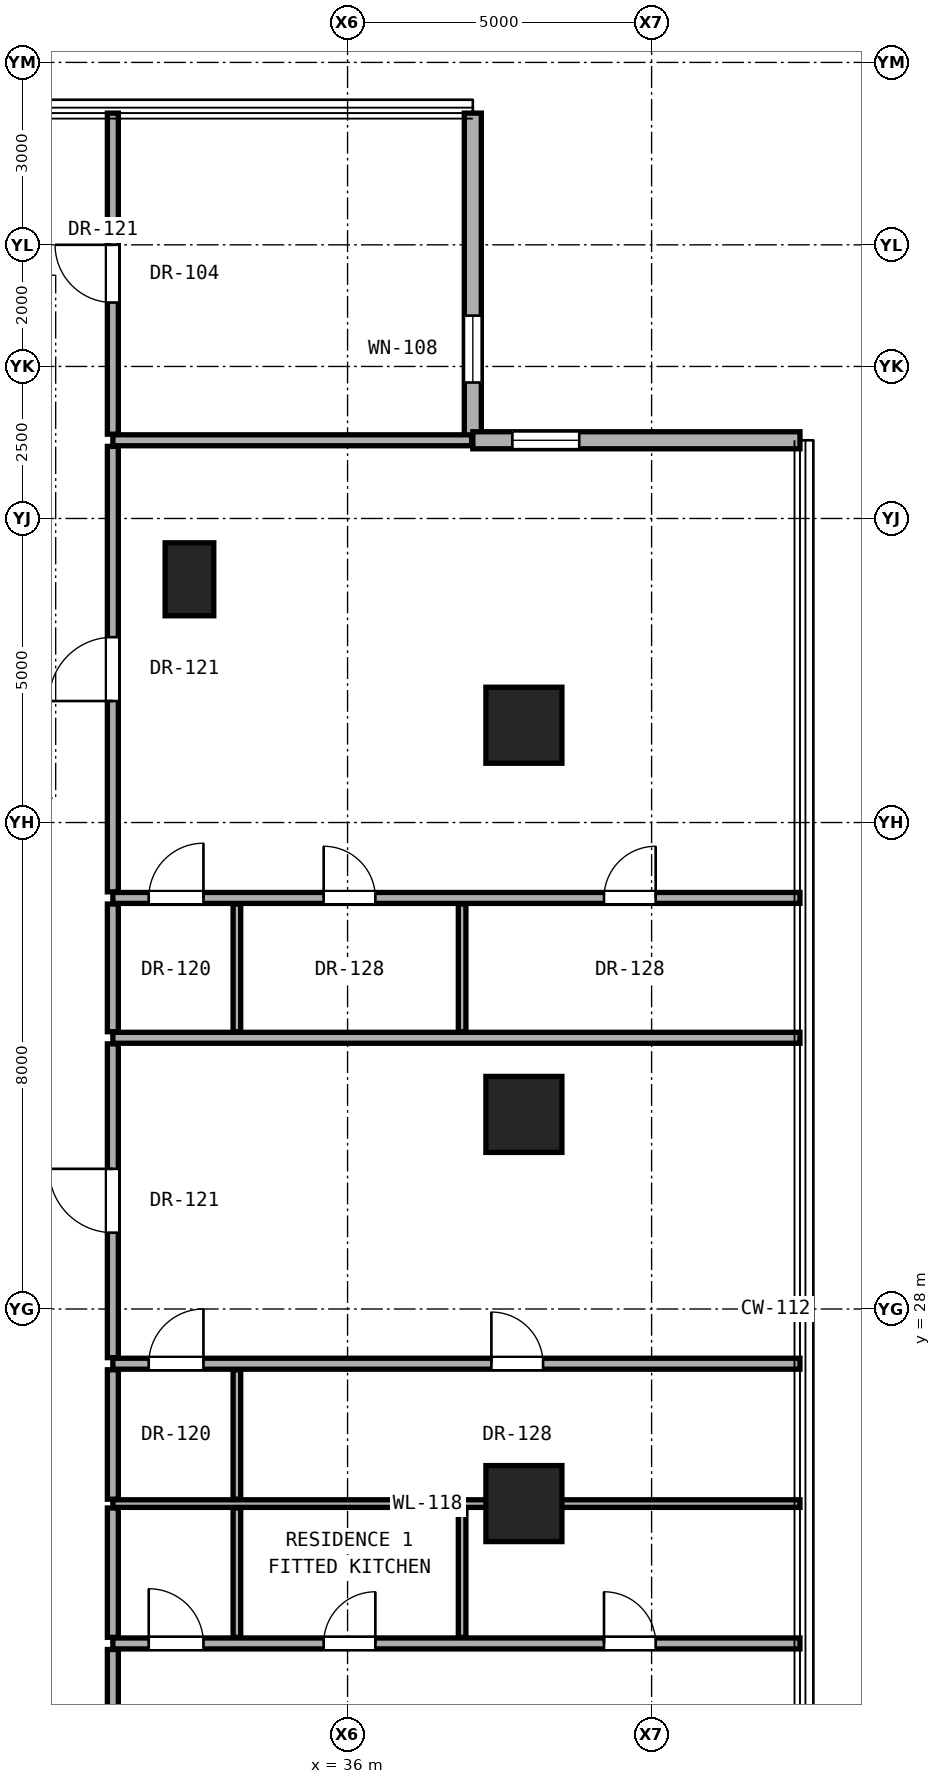
"""IFC4 building model, lengths in metres.
Left out: names, types, materials, properties, quantities, classifications, styles, units other than length and angle.
Written with IfcOpenShell. Run it as: python <this file> out.ifc"""

import sys

from ifc_helpers import new_model, si_unit, direction, frame, frame_2d, origin, origin_2d, place, context, subcontext, project, spatial, rectangle, hollow_rectangle, extrude, element, fill, save


model = new_model("IFC4")
c1 = context("Model", 3, precision=1e-05, world=origin(), true_north=direction((0.0, 1.0)))
c2 = subcontext(c1, "Body", "Model", "MODEL_VIEW")
j1 = project(units=[si_unit("LENGTHUNIT", "METRE"), si_unit("PLANEANGLEUNIT", "RADIAN")], contexts=[c1])
p1 = place(None, origin())
s1 = spatial("IfcSite", under=j1, at=p1, CompositionType="ELEMENT")
p2 = place(p1, origin())
s2 = spatial("IfcBuilding", under=s1, at=p2, CompositionType="ELEMENT")
p3 = place(p2, frame((0.0, 0.0, 45.5)))
s3 = spatial("IfcBuildingStorey", under=s2, at=p3, CompositionType="ELEMENT", Elevation=45.5)
for number, where, z_axis, x_axis in (
    (1, (38.9, 24.8, 0.0), (0.0, 0.0, 1.0), (1.0, 0.0, 0.0)),
    (2, (38.9, 31.2, 0.0), (0.0, 0.0, 1.0), (1.0, 0.0, 0.0)),
    (3, (38.9, 37.6, 0.0), (0.0, 0.0, 1.0), (1.0, 0.0, 0.0)),
):
    element("IfcColumn", number, at=place(p3, frame(where, z_axis=z_axis, x_axis=x_axis)), inside=s3, PredefinedType="COLUMN", context=c2, shape_type="SweptSolid", body=[
        extrude(hollow_rectangle(XDim=1.25, YDim=1.25, WallThickness=0.07, at=origin_2d()), origin(), (0.0, 0.0, 1.0), 3.3),
    ])
p4 = place(p3, frame((33.4, 40.0, 0.0), z_axis=(0.0, 0.0, 1.0), x_axis=(1.0, 0.0, 0.0)))
e4 = element("IfcColumn", 4, at=p4, inside=s3, PredefinedType="PILASTER", context=c2, shape_type="SweptSolid", body=[
    extrude(rectangle(XDim=0.8, YDim=1.2, at=origin_2d()), origin(), (0.0, 0.0, 1.0), 3.3),
])
p5 = place(p3, frame((38.06, 42.286, 0.0), z_axis=(0.0, 0.0, 1.0), x_axis=(0.0, 1.0, 0.0)))
e5 = element("IfcWall", 5, at=p5, inside=s3, PredefinedType="SOLIDWALL", context=c2, shape_type="SweptSolid", body=[
    extrude(rectangle(XDim=5.38, YDim=0.28, at=frame_2d((2.69, 0.0))), origin(), (0.0, 0.0, 1.0), 3.04),
])
p6 = place(p5, frame((0.95, 0.0, 0.85)))
e6 = element("IfcOpeningElement", 6, at=p6, cuts=e5, PredefinedType="OPENING", context=c2, shape_type="SweptSolid", body=[
    extrude(rectangle(XDim=1.1, YDim=2.0, at=frame_2d((0.55, 1.0))), frame((0.0, 0.15, 0.0), z_axis=(0.0, -1.0, 0.0), x_axis=(1.0, 0.0, 0.0)), (0.0, 0.0, 1.0), 0.3),
])
p7 = place(p3, frame((43.44, 42.286, 0.0), z_axis=(0.0, 0.0, 1.0), x_axis=(-1.0, 0.0, 0.0)))
e7 = element("IfcWall", 7, at=p7, inside=s3, PredefinedType="SOLIDWALL", context=c2, shape_type="SweptSolid", body=[
    extrude(rectangle(XDim=5.38, YDim=0.28, at=frame_2d((2.69, 0.0))), origin(), (0.0, 0.0, 1.0), 3.04),
])
p8 = place(p7, frame((3.63, 0.0, 0.85)))
e8 = element("IfcOpeningElement", 8, at=p8, cuts=e7, PredefinedType="OPENING", context=c2, shape_type="SweptSolid", body=[
    extrude(rectangle(XDim=1.1, YDim=2.0, at=frame_2d((0.55, 1.0))), frame((0.0, 0.15, 0.0), z_axis=(0.0, -1.0, 0.0), x_axis=(1.0, 0.0, 0.0)), (0.0, 0.0, 1.0), 0.3),
])
p9 = place(p3, frame((32.14, 22.5, 0.0), z_axis=(0.0, 0.0, 1.0), x_axis=(1.0, 0.0, 0.0)))
e9 = element("IfcWall", 9, at=p9, inside=s3, PredefinedType="PARTITIONING", context=c2, shape_type="SweptSolid", body=[
    extrude(rectangle(XDim=11.3, YDim=0.18, at=frame_2d((5.65, 0.0))), origin(), (0.0, 0.0, 1.0), 2.125),
])
p10 = place(p9, frame((8.077, 0.0, 0.0)))
e10 = element("IfcOpeningElement", 10, at=p10, cuts=e9, PredefinedType="OPENING", context=c2, shape_type="SweptSolid", body=[
    extrude(rectangle(XDim=0.85, YDim=2.01, at=frame_2d((0.425, 1.005))), frame((0.0, 0.1, 0.0), z_axis=(0.0, -1.0, 0.0), x_axis=(1.0, 0.0, 0.0)), (0.0, 0.0, 1.0), 0.2),
])
p11 = place(p9, frame((3.467, 0.0, 0.0)))
e11 = element("IfcOpeningElement", 11, at=p11, cuts=e9, PredefinedType="OPENING", context=c2, shape_type="SweptSolid", body=[
    extrude(rectangle(XDim=0.85, YDim=2.01, at=frame_2d((0.425, 1.005))), frame((0.0, 0.1, 0.0), z_axis=(0.0, -1.0, 0.0), x_axis=(1.0, 0.0, 0.0)), (0.0, 0.0, 1.0), 0.2),
])
p12 = place(p9, frame((0.59, 0.0, 0.0)))
e12 = element("IfcOpeningElement", 12, at=p12, cuts=e9, PredefinedType="OPENING", context=c2, shape_type="SweptSolid", body=[
    extrude(rectangle(XDim=0.9, YDim=2.1, at=frame_2d((0.45, 1.05))), frame((0.0, 0.1, 0.0), z_axis=(0.0, -1.0, 0.0), x_axis=(1.0, 0.0, 0.0)), (0.0, 0.0, 1.0), 0.2),
])
p13 = place(p3, frame((32.14, 24.8, 0.0), z_axis=(0.0, 0.0, 1.0), x_axis=(1.0, 0.0, 0.0)))
e13 = element("IfcWall", 13, at=p13, inside=s3, PredefinedType="PARTITIONING", context=c2, shape_type="SweptSolid", body=[
    extrude(rectangle(XDim=11.3, YDim=0.125, at=frame_2d((5.65, 0.0))), origin(), (0.0, 0.0, 1.0), 2.125),
])
p14 = place(p3, frame((32.14, 27.1, 0.0), z_axis=(0.0, 0.0, 1.0), x_axis=(1.0, 0.0, 0.0)))
e14 = element("IfcWall", 14, at=p14, inside=s3, PredefinedType="PARTITIONING", context=c2, shape_type="SweptSolid", body=[
    extrude(rectangle(XDim=11.3, YDim=0.18, at=frame_2d((5.65, 0.0))), origin(), (0.0, 0.0, 1.0), 2.125),
])
p15 = place(p14, frame((6.225, 0.0, 0.0)))
e15 = element("IfcOpeningElement", 15, at=p15, cuts=e14, PredefinedType="OPENING", context=c2, shape_type="SweptSolid", body=[
    extrude(rectangle(XDim=0.85, YDim=2.01, at=frame_2d((0.425, 1.005))), frame((0.0, 0.1, 0.0), z_axis=(0.0, -1.0, 0.0), x_axis=(1.0, 0.0, 0.0)), (0.0, 0.0, 1.0), 0.2),
])
p16 = place(p14, frame((0.59, 0.0, 0.0)))
e16 = element("IfcOpeningElement", 16, at=p16, cuts=e14, PredefinedType="OPENING", context=c2, shape_type="SweptSolid", body=[
    extrude(rectangle(XDim=0.9, YDim=2.1, at=frame_2d((0.45, 1.05))), frame((0.0, 0.1, 0.0), z_axis=(0.0, -1.0, 0.0), x_axis=(1.0, 0.0, 0.0)), (0.0, 0.0, 1.0), 0.2),
])
p17 = place(p3, frame((32.14, 32.46, 0.0), z_axis=(0.0, 0.0, 1.0), x_axis=(1.0, 0.0, 0.0)))
e17 = element("IfcWall", 17, at=p17, inside=s3, PredefinedType="PARTITIONING", context=c2, shape_type="SweptSolid", body=[
    extrude(rectangle(XDim=11.3, YDim=0.18, at=frame_2d((5.65, 0.0))), origin(), (0.0, 0.0, 1.0), 2.125),
])
p18 = place(p3, frame((32.14, 34.76, 0.0), z_axis=(0.0, 0.0, 1.0), x_axis=(1.0, 0.0, 0.0)))
e18 = element("IfcWall", 18, at=p18, inside=s3, PredefinedType="PARTITIONING", context=c2, shape_type="SweptSolid", body=[
    extrude(rectangle(XDim=11.3, YDim=0.18, at=frame_2d((5.65, 0.0))), origin(), (0.0, 0.0, 1.0), 2.125),
])
p19 = place(p18, frame((8.077, 0.0, 0.0)))
e19 = element("IfcOpeningElement", 19, at=p19, cuts=e18, PredefinedType="OPENING", context=c2, shape_type="SweptSolid", body=[
    extrude(rectangle(XDim=0.85, YDim=2.01, at=frame_2d((0.425, 1.005))), frame((0.0, 0.1, 0.0), z_axis=(0.0, -1.0, 0.0), x_axis=(1.0, 0.0, 0.0)), (0.0, 0.0, 1.0), 0.2),
])
p20 = place(p18, frame((3.467, 0.0, 0.0)))
e20 = element("IfcOpeningElement", 20, at=p20, cuts=e18, PredefinedType="OPENING", context=c2, shape_type="SweptSolid", body=[
    extrude(rectangle(XDim=0.85, YDim=2.01, at=frame_2d((0.425, 1.005))), frame((0.0, 0.1, 0.0), z_axis=(0.0, -1.0, 0.0), x_axis=(1.0, 0.0, 0.0)), (0.0, 0.0, 1.0), 0.2),
])
p21 = place(p18, frame((0.59, 0.0, 0.0)))
e21 = element("IfcOpeningElement", 21, at=p21, cuts=e18, PredefinedType="OPENING", context=c2, shape_type="SweptSolid", body=[
    extrude(rectangle(XDim=0.9, YDim=2.1, at=frame_2d((0.45, 1.05))), frame((0.0, 0.1, 0.0), z_axis=(0.0, -1.0, 0.0), x_axis=(1.0, 0.0, 0.0)), (0.0, 0.0, 1.0), 0.2),
])
p22 = place(p3, frame((32.14, 42.286, 0.0), z_axis=(0.0, 0.0, 1.0), x_axis=(1.0, 0.0, 0.0)))
e22 = element("IfcWall", 22, at=p22, inside=s3, PredefinedType="PARTITIONING", context=c2, shape_type="SweptSolid", body=[
    extrude(rectangle(XDim=5.9, YDim=0.18, at=frame_2d((2.95, 0.0))), origin(), (0.0, 0.0, 1.0), 3.06),
])
p23 = place(p3, frame((32.14, 13.814, 0.0), z_axis=(0.0, 0.0, 1.0), x_axis=(0.0, 1.0, 0.0)))
e23 = element("IfcWall", 23, at=p23, inside=s3, PredefinedType="PARTITIONING", context=c2, shape_type="SweptSolid", body=[
    extrude(rectangle(XDim=8.586, YDim=0.18, at=frame_2d((4.293, 0.0))), origin(), (0.0, 0.0, 1.0), 2.436),
])
p24 = place(p23, frame((3.768, 0.0, 0.0)))
e24 = element("IfcOpeningElement", 24, at=p24, cuts=e23, PredefinedType="OPENING", context=c2, shape_type="SweptSolid", body=[
    extrude(rectangle(XDim=1.05, YDim=2.2, at=frame_2d((0.525, 1.1))), frame((0.0, 0.1, 0.0), z_axis=(0.0, -1.0, 0.0), x_axis=(1.0, 0.0, 0.0)), (0.0, 0.0, 1.0), 0.2),
])
for number, where, z_axis, x_axis in (
    (25, (32.14, 22.6, 0.0), (0.0, 0.0, 1.0), (0.0, 1.0, 0.0)),
    (26, (32.14, 24.873, 0.0), (0.0, 0.0, 1.0), (0.0, 1.0, 0.0)),
):
    element("IfcWall", number, at=place(p3, frame(where, z_axis=z_axis, x_axis=x_axis)), inside=s3, PredefinedType="PARTITIONING", context=c2, shape_type="SweptSolid", body=[
        extrude(rectangle(XDim=2.127, YDim=0.18, at=frame_2d((1.064, 0.0))), origin(), (0.0, 0.0, 1.0), 2.279),
    ])
p25 = place(p3, frame((32.14, 27.2, 0.0), z_axis=(0.0, 0.0, 1.0), x_axis=(0.0, 1.0, 0.0)))
e27 = element("IfcWall", 27, at=p25, inside=s3, PredefinedType="PARTITIONING", context=c2, shape_type="SweptSolid", body=[
    extrude(rectangle(XDim=5.16, YDim=0.18, at=frame_2d((2.58, 0.0))), origin(), (0.0, 0.0, 1.0), 2.279),
])
p26 = place(p25, frame((2.055, 0.0, 0.0)))
e28 = element("IfcOpeningElement", 28, at=p26, cuts=e27, PredefinedType="OPENING", context=c2, shape_type="SweptSolid", body=[
    extrude(rectangle(XDim=1.05, YDim=2.2, at=frame_2d((0.525, 1.1))), frame((0.0, 0.1, 0.0), z_axis=(0.0, -1.0, 0.0), x_axis=(1.0, 0.0, 0.0)), (0.0, 0.0, 1.0), 0.2),
])
p27 = place(p3, frame((32.14, 32.56, 0.0), z_axis=(0.0, 0.0, 1.0), x_axis=(0.0, 1.0, 0.0)))
e29 = element("IfcWall", 29, at=p27, inside=s3, PredefinedType="PARTITIONING", context=c2, shape_type="SweptSolid", body=[
    extrude(rectangle(XDim=2.1, YDim=0.18, at=frame_2d((1.05, 0.0))), origin(), (0.0, 0.0, 1.0), 3.06),
])
p28 = place(p3, frame((32.14, 34.86, 0.0), z_axis=(0.0, 0.0, 1.0), x_axis=(0.0, 1.0, 0.0)))
e30 = element("IfcWall", 30, at=p28, inside=s3, PredefinedType="PARTITIONING", context=c2, shape_type="SweptSolid", body=[
    extrude(rectangle(XDim=7.326, YDim=0.18, at=frame_2d((3.663, 0.0))), origin(), (0.0, 0.0, 1.0), 2.436),
])
p29 = place(p28, frame((3.138, 0.0, 0.0)))
e31 = element("IfcOpeningElement", 31, at=p29, cuts=e30, PredefinedType="OPENING", context=c2, shape_type="SweptSolid", body=[
    extrude(rectangle(XDim=1.05, YDim=2.2, at=frame_2d((0.525, 1.1))), frame((0.0, 0.1, 0.0), z_axis=(0.0, -1.0, 0.0), x_axis=(1.0, 0.0, 0.0)), (0.0, 0.0, 1.0), 0.2),
])
p30 = place(p3, frame((32.14, 42.386, 0.0), z_axis=(0.0, 0.0, 1.0), x_axis=(0.0, 1.0, 0.0)))
e32 = element("IfcWall", 32, at=p30, inside=s3, PredefinedType="PARTITIONING", context=c2, shape_type="SweptSolid", body=[
    extrude(rectangle(XDim=5.28, YDim=0.18, at=frame_2d((2.64, 0.0))), origin(), (0.0, 0.0, 1.0), 3.06),
])
p31 = place(p30, frame((2.165, 0.0, 0.0)))
e33 = element("IfcOpeningElement", 33, at=p31, cuts=e32, PredefinedType="OPENING", context=c2, shape_type="SweptSolid", body=[
    extrude(rectangle(XDim=0.95, YDim=2.15, at=frame_2d((0.475, 1.075))), frame((0.0, 0.1, 0.0), z_axis=(0.0, -1.0, 0.0), x_axis=(1.0, 0.0, 0.0)), (0.0, 0.0, 1.0), 0.2),
])
for number, where, z_axis, x_axis in (
    (34, (34.18, 22.6, 0.0), (0.0, 0.0, 1.0), (0.0, 1.0, 0.0)),
    (35, (34.18, 24.873, 0.0), (0.0, 0.0, 1.0), (0.0, 1.0, 0.0)),
):
    element("IfcWall", number, at=place(p3, frame(where, z_axis=z_axis, x_axis=x_axis)), inside=s3, PredefinedType="PARTITIONING", context=c2, shape_type="SweptSolid", body=[
        extrude(rectangle(XDim=2.127, YDim=0.125, at=frame_2d((1.064, 0.0))), origin(), (0.0, 0.0, 1.0), 2.279),
    ])
p32 = place(p3, frame((34.18, 32.56, 0.0), z_axis=(0.0, 0.0, 1.0), x_axis=(0.0, 1.0, 0.0)))
e36 = element("IfcWall", 36, at=p32, inside=s3, PredefinedType="PARTITIONING", context=c2, shape_type="SweptSolid", body=[
    extrude(rectangle(XDim=2.1, YDim=0.125, at=frame_2d((1.05, 0.0))), origin(), (0.0, 0.0, 1.0), 3.06),
])
p33 = place(p3, frame((37.884, 22.6, 0.0), z_axis=(0.0, 0.0, 1.0), x_axis=(0.0, 1.0, 0.0)))
e37 = element("IfcWall", 37, at=p33, inside=s3, PredefinedType="PARTITIONING", context=c2, shape_type="SweptSolid", body=[
    extrude(rectangle(XDim=2.127, YDim=0.125, at=frame_2d((1.064, 0.0))), origin(), (0.0, 0.0, 1.0), 2.279),
])
p34 = place(p3, frame((37.884, 32.56, 0.0), z_axis=(0.0, 0.0, 1.0), x_axis=(0.0, 1.0, 0.0)))
e38 = element("IfcWall", 38, at=p34, inside=s3, PredefinedType="PARTITIONING", context=c2, shape_type="SweptSolid", body=[
    extrude(rectangle(XDim=2.1, YDim=0.125, at=frame_2d((1.05, 0.0))), origin(), (0.0, 0.0, 1.0), 3.06),
])
p35 = place(p6, origin())
e39 = element("IfcWindow", 39, at=p35, inside=s3, PartitioningType="SINGLE_PANEL", PredefinedType="WINDOW", context=c2, shape_type="SweptSolid", body=[
    extrude(rectangle(XDim=1.1, YDim=2.0, at=frame_2d((0.55, 1.0))), frame((0.0, 0.03, 0.0), z_axis=(0.0, -1.0, 0.0), x_axis=(1.0, 0.0, 0.0)), (0.0, 0.0, 1.0), 0.06),
])
fill(e6, e39)
p36 = place(p8, origin())
e40 = element("IfcWindow", 40, at=p36, inside=s3, PartitioningType="SINGLE_PANEL", PredefinedType="WINDOW", context=c2, shape_type="SweptSolid", body=[
    extrude(rectangle(XDim=1.1, YDim=2.0, at=frame_2d((0.55, 1.0))), frame((0.0, 0.03, 0.0), z_axis=(0.0, -1.0, 0.0), x_axis=(1.0, 0.0, 0.0)), (0.0, 0.0, 1.0), 0.06),
])
fill(e8, e40)
p37 = place(p10, origin())
e41 = element("IfcDoor", 41, at=p37, inside=s3, OperationType="SINGLE_SWING_LEFT", PredefinedType="DOOR", context=c2, shape_type="SweptSolid", body=[
    extrude(rectangle(XDim=0.85, YDim=2.01, at=frame_2d((0.425, 1.005))), frame((0.0, 0.025, 0.0), z_axis=(0.0, -1.0, 0.0), x_axis=(1.0, 0.0, 0.0)), (0.0, 0.0, 1.0), 0.05),
])
fill(e10, e41)
p38 = place(p11, origin())
e42 = element("IfcDoor", 42, at=p38, inside=s3, OperationType="SINGLE_SWING_RIGHT", PredefinedType="DOOR", context=c2, shape_type="SweptSolid", body=[
    extrude(rectangle(XDim=0.85, YDim=2.01, at=frame_2d((0.425, 1.005))), frame((0.0, 0.025, 0.0), z_axis=(0.0, -1.0, 0.0), x_axis=(1.0, 0.0, 0.0)), (0.0, 0.0, 1.0), 0.05),
])
fill(e11, e42)
p39 = place(p12, origin())
e43 = element("IfcDoor", 43, at=p39, inside=s3, OperationType="SINGLE_SWING_LEFT", PredefinedType="DOOR", context=c2, shape_type="SweptSolid", body=[
    extrude(rectangle(XDim=0.9, YDim=2.1, at=frame_2d((0.45, 1.05))), frame((0.0, 0.025, 0.0), z_axis=(0.0, -1.0, 0.0), x_axis=(1.0, 0.0, 0.0)), (0.0, 0.0, 1.0), 0.05),
])
fill(e12, e43)
p40 = place(p26, origin())
e44 = element("IfcDoor", 44, at=p40, inside=s3, OperationType="SINGLE_SWING_RIGHT", PredefinedType="DOOR", context=c2, shape_type="SweptSolid", body=[
    extrude(rectangle(XDim=1.05, YDim=2.2, at=frame_2d((0.525, 1.1))), frame((0.0, 0.025, 0.0), z_axis=(0.0, -1.0, 0.0), x_axis=(1.0, 0.0, 0.0)), (0.0, 0.0, 1.0), 0.05),
])
fill(e28, e44)
p41 = place(p15, origin())
e45 = element("IfcDoor", 45, at=p41, inside=s3, OperationType="SINGLE_SWING_LEFT", PredefinedType="DOOR", context=c2, shape_type="SweptSolid", body=[
    extrude(rectangle(XDim=0.85, YDim=2.01, at=frame_2d((0.425, 1.005))), frame((0.0, 0.025, 0.0), z_axis=(0.0, -1.0, 0.0), x_axis=(1.0, 0.0, 0.0)), (0.0, 0.0, 1.0), 0.05),
])
fill(e15, e45)
p42 = place(p16, origin())
e46 = element("IfcDoor", 46, at=p42, inside=s3, OperationType="SINGLE_SWING_RIGHT", PredefinedType="DOOR", context=c2, shape_type="SweptSolid", body=[
    extrude(rectangle(XDim=0.9, YDim=2.1, at=frame_2d((0.45, 1.05))), frame((0.0, 0.025, 0.0), z_axis=(0.0, -1.0, 0.0), x_axis=(1.0, 0.0, 0.0)), (0.0, 0.0, 1.0), 0.05),
])
fill(e16, e46)
p43 = place(p29, origin())
e47 = element("IfcDoor", 47, at=p43, inside=s3, OperationType="SINGLE_SWING_LEFT", PredefinedType="DOOR", context=c2, shape_type="SweptSolid", body=[
    extrude(rectangle(XDim=1.05, YDim=2.2, at=frame_2d((0.525, 1.1))), frame((0.0, 0.025, 0.0), z_axis=(0.0, -1.0, 0.0), x_axis=(1.0, 0.0, 0.0)), (0.0, 0.0, 1.0), 0.05),
])
fill(e31, e47)
p44 = place(p19, origin())
e48 = element("IfcDoor", 48, at=p44, inside=s3, OperationType="SINGLE_SWING_RIGHT", PredefinedType="DOOR", context=c2, shape_type="SweptSolid", body=[
    extrude(rectangle(XDim=0.85, YDim=2.01, at=frame_2d((0.425, 1.005))), frame((0.0, 0.025, 0.0), z_axis=(0.0, -1.0, 0.0), x_axis=(1.0, 0.0, 0.0)), (0.0, 0.0, 1.0), 0.05),
])
fill(e19, e48)
p45 = place(p20, origin())
e49 = element("IfcDoor", 49, at=p45, inside=s3, OperationType="SINGLE_SWING_LEFT", PredefinedType="DOOR", context=c2, shape_type="SweptSolid", body=[
    extrude(rectangle(XDim=0.85, YDim=2.01, at=frame_2d((0.425, 1.005))), frame((0.0, 0.025, 0.0), z_axis=(0.0, -1.0, 0.0), x_axis=(1.0, 0.0, 0.0)), (0.0, 0.0, 1.0), 0.05),
])
fill(e20, e49)
p46 = place(p21, origin())
e50 = element("IfcDoor", 50, at=p46, inside=s3, OperationType="SINGLE_SWING_RIGHT", PredefinedType="DOOR", context=c2, shape_type="SweptSolid", body=[
    extrude(rectangle(XDim=0.9, YDim=2.1, at=frame_2d((0.45, 1.05))), frame((0.0, 0.025, 0.0), z_axis=(0.0, -1.0, 0.0), x_axis=(1.0, 0.0, 0.0)), (0.0, 0.0, 1.0), 0.05),
])
fill(e21, e50)
p47 = place(p31, origin())
e51 = element("IfcDoor", 51, at=p47, inside=s3, OperationType="SINGLE_SWING_RIGHT", PredefinedType="DOOR", context=c2, shape_type="SweptSolid", body=[
    extrude(rectangle(XDim=0.95, YDim=2.15, at=frame_2d((0.475, 1.075))), frame((0.0, 0.025, 0.0), z_axis=(0.0, -1.0, 0.0), x_axis=(1.0, 0.0, 0.0)), (0.0, 0.0, 1.0), 0.05),
])
fill(e33, e51)
save(model, sys.argv[1])
